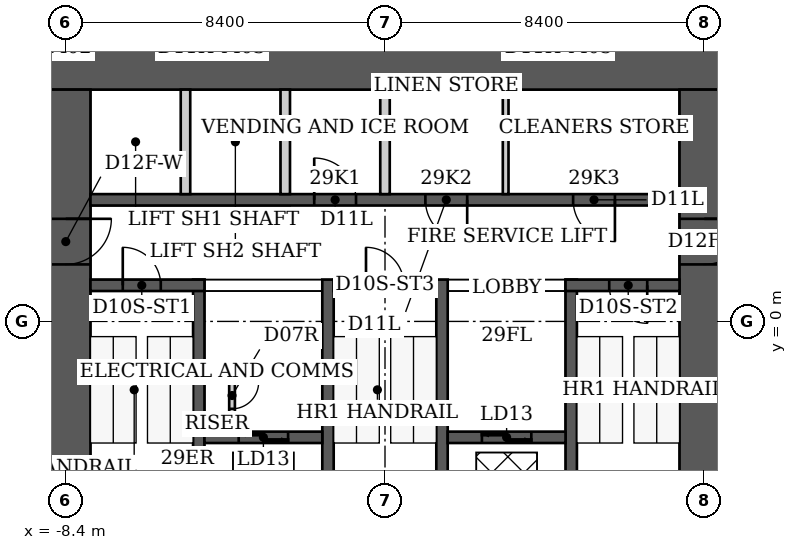
"""IFC4 building model, lengths in metres.
Left out: names, types, materials, properties, quantities, classifications, styles, units other than length and angle.
Written with IfcOpenShell. Run it as: python <this file> out.ifc"""

import sys

from ifc_helpers import new_model, si_unit, direction, frame, frame_2d, origin, place, context, subcontext, project, spatial, rectangle, extrude, element, fill, save


model = new_model("IFC4")
c1 = context("Model", 3, precision=1e-05, world=origin(), true_north=direction((0.0, 1.0)))
c2 = subcontext(c1, "Body", "Model", "MODEL_VIEW")
j1 = project(units=[si_unit("LENGTHUNIT", "METRE"), si_unit("PLANEANGLEUNIT", "RADIAN")], contexts=[c1])
p1 = place(None, origin())
s1 = spatial("IfcSite", under=j1, at=p1, CompositionType="ELEMENT")
p2 = place(p1, origin())
s2 = spatial("IfcBuilding", under=s1, at=p2, CompositionType="ELEMENT")
p3 = place(p2, frame((0.0, 0.0, 119.6)))
s3 = spatial("IfcBuildingStorey", under=s2, at=p3, CompositionType="ELEMENT", Elevation=119.6)
p4 = place(p3, frame((-9.05, 6.75, 0.0), z_axis=(0.0, 0.0, 1.0), x_axis=(1.0, 0.0, 0.0)))
e1 = element("IfcWall", 1, at=p4, inside=s3, PredefinedType="SHEAR", context=c2, shape_type="SweptSolid", body=[
    extrude(rectangle(XDim=18.1, YDim=1.3, at=frame_2d((9.05, 0.0))), origin(), (0.0, 0.0, 1.0), 3.8),
])
p5 = place(p3, frame((-8.4, -9.2, 0.0), z_axis=(0.0, 0.0, 1.0), x_axis=(0.0, 1.0, 0.0)))
e2 = element("IfcWall", 2, at=p5, inside=s3, PredefinedType="SHEAR", context=c2, shape_type="SweptSolid", body=[
    extrude(rectangle(XDim=15.3, YDim=1.3, at=frame_2d((7.65, 0.0))), origin(), (0.0, 0.0, 1.0), 3.8),
])
p6 = place(p5, frame((10.7, 0.0, 0.0)))
e3 = element("IfcOpeningElement", 3, at=p6, cuts=e2, PredefinedType="OPENING", context=c2, shape_type="SweptSolid", body=[
    extrude(rectangle(XDim=1.2, YDim=2.2, at=frame_2d((0.6, 1.1))), frame((0.0, 0.65, 0.0), z_axis=(0.0, -1.0, 0.0), x_axis=(1.0, 0.0, 0.0)), (0.0, 0.0, 1.0), 1.3),
])
p7 = place(p3, frame((8.4, -9.2, 0.0), z_axis=(0.0, 0.0, 1.0), x_axis=(0.0, 1.0, 0.0)))
e4 = element("IfcWall", 4, at=p7, inside=s3, PredefinedType="SHEAR", context=c2, shape_type="SweptSolid", body=[
    extrude(rectangle(XDim=15.3, YDim=1.3, at=frame_2d((7.65, 0.0))), origin(), (0.0, 0.0, 1.0), 3.8),
])
p8 = place(p7, frame((10.7, 0.0, 0.0)))
e5 = element("IfcOpeningElement", 5, at=p8, cuts=e4, PredefinedType="OPENING", context=c2, shape_type="SweptSolid", body=[
    extrude(rectangle(XDim=1.2, YDim=2.2, at=frame_2d((0.6, 1.1))), frame((0.0, 0.65, 0.0), z_axis=(0.0, -1.0, 0.0), x_axis=(1.0, 0.0, 0.0)), (0.0, 0.0, 1.0), 1.3),
])
for number, where, z_axis, x_axis in (
    (6, (-4.9, -6.1, 0.0), (0.0, 0.0, 1.0), (0.0, 1.0, 0.0)),
    (7, (-1.5, -6.1, 0.0), (0.0, 0.0, 1.0), (0.0, 1.0, 0.0)),
    (8, (1.5, -6.1, 0.0), (0.0, 0.0, 1.0), (0.0, 1.0, 0.0)),
    (9, (4.9, -6.1, 0.0), (0.0, 0.0, 1.0), (0.0, 1.0, 0.0)),
):
    element("IfcWall", number, at=place(p3, frame(where, z_axis=z_axis, x_axis=x_axis)), inside=s3, PredefinedType="SHEAR", context=c2, shape_type="SweptSolid", body=[
        extrude(rectangle(XDim=7.2, YDim=0.3, at=frame_2d((3.6, 0.0))), origin(), (0.0, 0.0, 1.0), 3.8),
    ])
p9 = place(p3, frame((-7.75, 0.95, 0.0), z_axis=(0.0, 0.0, 1.0), x_axis=(1.0, 0.0, 0.0)))
e10 = element("IfcWall", 10, at=p9, inside=s3, PredefinedType="SHEAR", context=c2, shape_type="SweptSolid", body=[
    extrude(rectangle(XDim=3.0, YDim=0.3, at=frame_2d((1.5, 0.0))), origin(), (0.0, 0.0, 1.0), 3.8),
])
p10 = place(p9, frame((0.85, 0.0, 0.0)))
e11 = element("IfcOpeningElement", 11, at=p10, cuts=e10, PredefinedType="OPENING", context=c2, shape_type="SweptSolid", body=[
    extrude(rectangle(XDim=1.0, YDim=2.2, at=frame_2d((0.5, 1.1))), frame((0.0, 0.15, 0.0), z_axis=(0.0, -1.0, 0.0), x_axis=(1.0, 0.0, 0.0)), (0.0, 0.0, 1.0), 0.3),
])
p11 = place(p3, frame((-1.35, 0.95, 0.0), z_axis=(0.0, 0.0, 1.0), x_axis=(1.0, 0.0, 0.0)))
e12 = element("IfcWall", 12, at=p11, inside=s3, PredefinedType="SHEAR", context=c2, shape_type="SweptSolid", body=[
    extrude(rectangle(XDim=2.7, YDim=0.3, at=frame_2d((1.35, 0.0))), origin(), (0.0, 0.0, 1.0), 3.8),
])
p12 = place(p11, frame((0.85, 0.0, 0.0)))
e13 = element("IfcOpeningElement", 13, at=p12, cuts=e12, PredefinedType="OPENING", context=c2, shape_type="SweptSolid", body=[
    extrude(rectangle(XDim=1.0, YDim=2.2, at=frame_2d((0.5, 1.1))), frame((0.0, 0.15, 0.0), z_axis=(0.0, -1.0, 0.0), x_axis=(1.0, 0.0, 0.0)), (0.0, 0.0, 1.0), 0.3),
])
p13 = place(p3, frame((4.75, 0.95, 0.0), z_axis=(0.0, 0.0, 1.0), x_axis=(1.0, 0.0, 0.0)))
e14 = element("IfcWall", 14, at=p13, inside=s3, PredefinedType="SHEAR", context=c2, shape_type="SweptSolid", body=[
    extrude(rectangle(XDim=3.0, YDim=0.3, at=frame_2d((1.5, 0.0))), origin(), (0.0, 0.0, 1.0), 3.8),
])
p14 = place(p13, frame((1.15, 0.0, 0.0)))
e15 = element("IfcOpeningElement", 15, at=p14, cuts=e14, PredefinedType="OPENING", context=c2, shape_type="SweptSolid", body=[
    extrude(rectangle(XDim=1.0, YDim=2.2, at=frame_2d((0.5, 1.1))), frame((0.0, 0.15, 0.0), z_axis=(0.0, -1.0, 0.0), x_axis=(1.0, 0.0, 0.0)), (0.0, 0.0, 1.0), 0.3),
])
p15 = place(p3, frame((-4.75, -3.05, 0.0), z_axis=(0.0, 0.0, 1.0), x_axis=(1.0, 0.0, 0.0)))
e16 = element("IfcWall", 16, at=p15, inside=s3, PredefinedType="SHEAR", context=c2, shape_type="SweptSolid", body=[
    extrude(rectangle(XDim=3.1, YDim=0.3, at=frame_2d((1.55, 0.0))), origin(), (0.0, 0.0, 1.0), 3.8),
])
p16 = place(p15, frame((0.9, 0.0, 0.0)))
e17 = element("IfcOpeningElement", 17, at=p16, cuts=e16, PredefinedType="OPENING", context=c2, shape_type="SweptSolid", body=[
    extrude(rectangle(XDim=1.3, YDim=2.1, at=frame_2d((0.65, 1.05))), frame((0.0, 0.15, 0.0), z_axis=(0.0, -1.0, 0.0), x_axis=(1.0, 0.0, 0.0)), (0.0, 0.0, 1.0), 0.3),
])
p17 = place(p3, frame((1.65, -3.05, 0.0), z_axis=(0.0, 0.0, 1.0), x_axis=(1.0, 0.0, 0.0)))
e18 = element("IfcWall", 18, at=p17, inside=s3, PredefinedType="SHEAR", context=c2, shape_type="SweptSolid", body=[
    extrude(rectangle(XDim=3.1, YDim=0.3, at=frame_2d((1.55, 0.0))), origin(), (0.0, 0.0, 1.0), 3.8),
])
p18 = place(p17, frame((0.9, 0.0, 0.0)))
e19 = element("IfcOpeningElement", 19, at=p18, cuts=e18, PredefinedType="OPENING", context=c2, shape_type="SweptSolid", body=[
    extrude(rectangle(XDim=1.3, YDim=2.1, at=frame_2d((0.65, 1.05))), frame((0.0, 0.15, 0.0), z_axis=(0.0, -1.0, 0.0), x_axis=(1.0, 0.0, 0.0)), (0.0, 0.0, 1.0), 0.3),
])
p19 = place(p3, frame((-7.75, 3.2, 0.0), z_axis=(0.0, 0.0, 1.0), x_axis=(1.0, 0.0, 0.0)))
e20 = element("IfcWall", 20, at=p19, inside=s3, PredefinedType="SHEAR", context=c2, shape_type="SweptSolid", body=[
    extrude(rectangle(XDim=15.5, YDim=0.3, at=frame_2d((7.75, 0.0))), origin(), (0.0, 0.0, 1.0), 3.8),
])
p20 = place(p19, frame((5.887, 0.0, 0.0)))
e21 = element("IfcOpeningElement", 21, at=p20, cuts=e20, PredefinedType="OPENING", context=c2, shape_type="SweptSolid", body=[
    extrude(rectangle(XDim=1.1, YDim=2.2, at=frame_2d((0.55, 1.1))), frame((0.0, 0.15, 0.0), z_axis=(0.0, -1.0, 0.0), x_axis=(1.0, 0.0, 0.0)), (0.0, 0.0, 1.0), 0.3),
])
p21 = place(p19, frame((8.812, 0.0, 0.0)))
e22 = element("IfcOpeningElement", 22, at=p21, cuts=e20, PredefinedType="OPENING", context=c2, shape_type="SweptSolid", body=[
    extrude(rectangle(XDim=1.1, YDim=2.2, at=frame_2d((0.55, 1.1))), frame((0.0, 0.15, 0.0), z_axis=(0.0, -1.0, 0.0), x_axis=(1.0, 0.0, 0.0)), (0.0, 0.0, 1.0), 0.3),
])
p22 = place(p19, frame((12.7, 0.0, 0.0)))
e23 = element("IfcOpeningElement", 23, at=p22, cuts=e20, PredefinedType="OPENING", context=c2, shape_type="SweptSolid", body=[
    extrude(rectangle(XDim=1.1, YDim=2.2, at=frame_2d((0.55, 1.1))), frame((0.0, 0.15, 0.0), z_axis=(0.0, -1.0, 0.0), x_axis=(1.0, 0.0, 0.0)), (0.0, 0.0, 1.0), 0.3),
])
for number, where, z_axis, x_axis in (
    (24, (-5.25, 3.35, 0.0), (0.0, 0.0, 1.0), (0.0, 1.0, 0.0)),
    (25, (-2.625, 3.35, 0.0), (0.0, 0.0, 1.0), (0.0, 1.0, 0.0)),
    (26, (0.0, 3.35, 0.0), (0.0, 0.0, 1.0), (0.0, 1.0, 0.0)),
):
    element("IfcWall", number, at=place(p3, frame(where, z_axis=z_axis, x_axis=x_axis)), inside=s3, PredefinedType="PARTITIONING", context=c2, shape_type="SweptSolid", body=[
        extrude(rectangle(XDim=2.75, YDim=0.25, at=frame_2d((1.375, 0.0))), origin(), (0.0, 0.0, 1.0), 3.8),
    ])
p23 = place(p3, frame((-4.025, -2.9, 0.0), z_axis=(0.0, 0.0, 1.0), x_axis=(0.0, 1.0, 0.0)))
e27 = element("IfcWall", 27, at=p23, inside=s3, PredefinedType="PARTITIONING", context=c2, shape_type="SweptSolid", body=[
    extrude(rectangle(XDim=1.775, YDim=0.15, at=frame_2d((0.887, 0.0))), origin(), (0.0, 0.0, 1.0), 3.64),
])
p24 = place(p23, frame((0.6, 0.0, 0.0)))
e28 = element("IfcOpeningElement", 28, at=p24, cuts=e27, PredefinedType="OPENING", context=c2, shape_type="SweptSolid", body=[
    extrude(rectangle(XDim=0.7, YDim=2.1, at=frame_2d((0.35, 1.05))), frame((0.0, 0.075, 0.0), z_axis=(0.0, -1.0, 0.0), x_axis=(1.0, 0.0, 0.0)), (0.0, 0.0, 1.0), 0.15),
])
p25 = place(p3, frame((-4.75, -1.2, 0.0), z_axis=(0.0, 0.0, 1.0), x_axis=(1.0, 0.0, 0.0)))
e29 = element("IfcWall", 29, at=p25, inside=s3, PredefinedType="PARTITIONING", context=c2, shape_type="SweptSolid", body=[
    extrude(rectangle(XDim=0.8, YDim=0.15, at=frame_2d((0.4, 0.0))), origin(), (0.0, 0.0, 1.0), 3.64),
])
p26 = place(p3, frame((3.175, 3.35, 0.0), z_axis=(0.0, 0.0, 1.0), x_axis=(0.0, 1.0, 0.0)))
e30 = element("IfcWall", 30, at=p26, inside=s3, PredefinedType="PARTITIONING", context=c2, shape_type="SweptSolid", body=[
    extrude(rectangle(XDim=2.75, YDim=0.15, at=frame_2d((1.375, 0.0))), origin(), (0.0, 0.0, 1.0), 3.64),
])
p27 = place(p10, origin())
e31 = element("IfcDoor", 31, at=p27, inside=s3, OperationType="SINGLE_SWING_LEFT", PredefinedType="DOOR", context=c2, shape_type="SweptSolid", body=[
    extrude(rectangle(XDim=1.0, YDim=2.2, at=frame_2d((0.5, 1.1))), frame((0.0, 0.025, 0.0), z_axis=(0.0, -1.0, 0.0), x_axis=(1.0, 0.0, 0.0)), (0.0, 0.0, 1.0), 0.05),
])
fill(e11, e31)
p28 = place(p12, origin())
e32 = element("IfcDoor", 32, at=p28, inside=s3, OperationType="SINGLE_SWING_LEFT", PredefinedType="DOOR", context=c2, shape_type="SweptSolid", body=[
    extrude(rectangle(XDim=1.0, YDim=2.2, at=frame_2d((0.5, 1.1))), frame((0.0, 0.025, 0.0), z_axis=(0.0, -1.0, 0.0), x_axis=(1.0, 0.0, 0.0)), (0.0, 0.0, 1.0), 0.05),
])
fill(e13, e32)
p29 = place(p14, origin())
e33 = element("IfcDoor", 33, at=p29, inside=s3, OperationType="SINGLE_SWING_RIGHT", PredefinedType="DOOR", context=c2, shape_type="SweptSolid", body=[
    extrude(rectangle(XDim=1.0, YDim=2.2, at=frame_2d((0.5, 1.1))), frame((0.0, 0.025, 0.0), z_axis=(0.0, -1.0, 0.0), x_axis=(1.0, 0.0, 0.0)), (0.0, 0.0, 1.0), 0.05),
])
fill(e15, e33)
p30 = place(p6, origin())
e34 = element("IfcDoor", 34, at=p30, inside=s3, OperationType="SINGLE_SWING_RIGHT", PredefinedType="DOOR", context=c2, shape_type="SweptSolid", body=[
    extrude(rectangle(XDim=1.2, YDim=2.2, at=frame_2d((0.6, 1.1))), frame((0.0, 0.025, 0.0), z_axis=(0.0, -1.0, 0.0), x_axis=(1.0, 0.0, 0.0)), (0.0, 0.0, 1.0), 0.05),
])
fill(e3, e34)
p31 = place(p8, origin())
e35 = element("IfcDoor", 35, at=p31, inside=s3, OperationType="SINGLE_SWING_RIGHT", PredefinedType="DOOR", context=c2, shape_type="SweptSolid", body=[
    extrude(rectangle(XDim=1.2, YDim=2.2, at=frame_2d((0.6, 1.1))), frame((0.0, 0.025, 0.0), z_axis=(0.0, -1.0, 0.0), x_axis=(1.0, 0.0, 0.0)), (0.0, 0.0, 1.0), 0.05),
])
fill(e5, e35)
p32 = place(p24, origin())
e36 = element("IfcDoor", 36, at=p32, inside=s3, OperationType="SINGLE_SWING_RIGHT", PredefinedType="DOOR", context=c2, shape_type="SweptSolid", body=[
    extrude(rectangle(XDim=0.7, YDim=2.1, at=frame_2d((0.35, 1.05))), frame((0.0, 0.025, 0.0), z_axis=(0.0, -1.0, 0.0), x_axis=(1.0, 0.0, 0.0)), (0.0, 0.0, 1.0), 0.05),
])
fill(e28, e36)
p33 = place(p20, origin())
e37 = element("IfcDoor", 37, at=p33, inside=s3, OperationType="SINGLE_SWING_LEFT", PredefinedType="DOOR", context=c2, shape_type="SweptSolid", body=[
    extrude(rectangle(XDim=1.1, YDim=2.2, at=frame_2d((0.55, 1.1))), frame((0.0, 0.025, 0.0), z_axis=(0.0, -1.0, 0.0), x_axis=(1.0, 0.0, 0.0)), (0.0, 0.0, 1.0), 0.05),
])
fill(e21, e37)
p34 = place(p21, origin())
e38 = element("IfcDoor", 38, at=p34, inside=s3, OperationType="SINGLE_SWING_RIGHT", PredefinedType="DOOR", context=c2, shape_type="SweptSolid", body=[
    extrude(rectangle(XDim=1.1, YDim=2.2, at=frame_2d((0.55, 1.1))), frame((0.0, 0.025, 0.0), z_axis=(0.0, -1.0, 0.0), x_axis=(1.0, 0.0, 0.0)), (0.0, 0.0, 1.0), 0.05),
])
fill(e22, e38)
p35 = place(p22, origin())
e39 = element("IfcDoor", 39, at=p35, inside=s3, OperationType="SINGLE_SWING_RIGHT", PredefinedType="DOOR", context=c2, shape_type="SweptSolid", body=[
    extrude(rectangle(XDim=1.1, YDim=2.2, at=frame_2d((0.55, 1.1))), frame((0.0, 0.025, 0.0), z_axis=(0.0, -1.0, 0.0), x_axis=(1.0, 0.0, 0.0)), (0.0, 0.0, 1.0), 0.05),
])
fill(e23, e39)
p36 = place(p16, origin())
e40 = element("IfcDoor", 40, at=p36, inside=s3, OperationType="DOUBLE_DOOR_SLIDING", PredefinedType="DOOR", context=c2, shape_type="SweptSolid", body=[
    extrude(rectangle(XDim=1.3, YDim=2.1, at=frame_2d((0.65, 1.05))), frame((0.0, 0.025, 0.0), z_axis=(0.0, -1.0, 0.0), x_axis=(1.0, 0.0, 0.0)), (0.0, 0.0, 1.0), 0.05),
])
fill(e17, e40)
p37 = place(p18, origin())
e41 = element("IfcDoor", 41, at=p37, inside=s3, OperationType="DOUBLE_DOOR_SLIDING", PredefinedType="DOOR", context=c2, shape_type="SweptSolid", body=[
    extrude(rectangle(XDim=1.3, YDim=2.1, at=frame_2d((0.65, 1.05))), frame((0.0, 0.025, 0.0), z_axis=(0.0, -1.0, 0.0), x_axis=(1.0, 0.0, 0.0)), (0.0, 0.0, 1.0), 0.05),
])
fill(e19, e41)
save(model, sys.argv[1])
